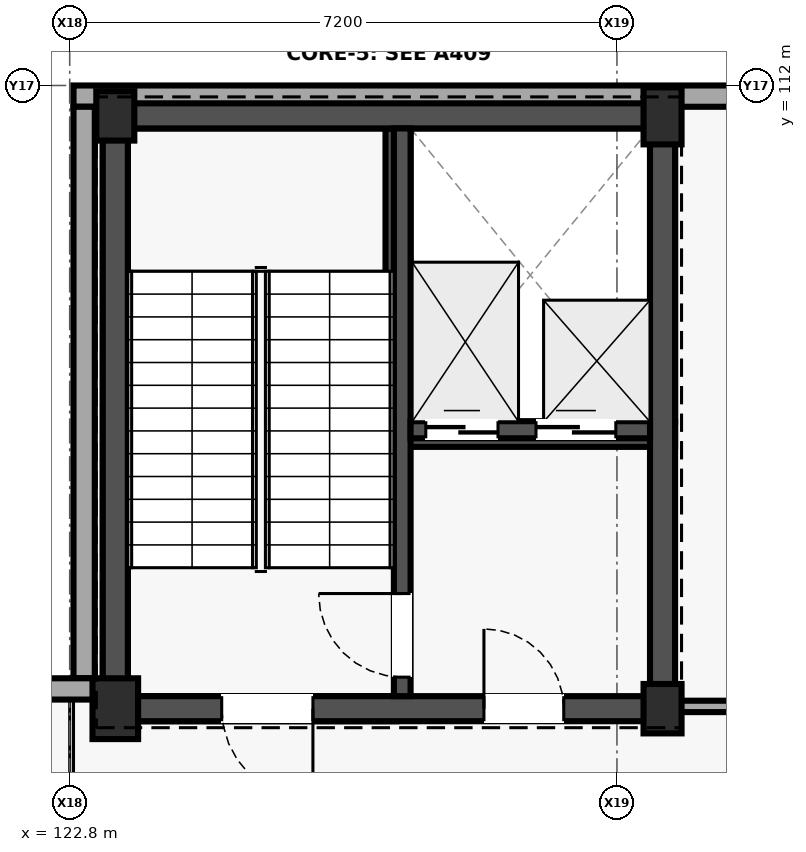
"""IFC4 building model, lengths in metres.
Left out: names, types, materials, properties, quantities, classifications, styles, units other than length and angle.
Written with IfcOpenShell. Run it as: python <this file> out.ifc"""

import sys

from ifc_helpers import new_model, si_unit, direction, frame, frame_2d, origin, origin_2d, place, context, subcontext, project, spatial, rectangle, extrude, element, fill, save


model = new_model("IFC4")
c1 = context("Model", 3, precision=1e-05, world=origin(), true_north=direction((0.0, 1.0)))
c2 = subcontext(c1, "Body", "Model", "MODEL_VIEW")
j1 = project(units=[si_unit("LENGTHUNIT", "METRE"), si_unit("PLANEANGLEUNIT", "RADIAN")], contexts=[c1])
p1 = place(None, origin())
s1 = spatial("IfcSite", under=j1, at=p1, CompositionType="ELEMENT")
p2 = place(p1, origin())
s2 = spatial("IfcBuilding", under=s1, at=p2, CompositionType="ELEMENT")
p3 = place(p2, origin())
s3 = spatial("IfcBuildingStorey", under=s2, at=p3, CompositionType="ELEMENT", Elevation=0.0)
for number, where, z_axis, x_axis in (
    (1, (126.955, 107.41, -1.55), (0.0, 0.0, 1.0), (1.0, 0.0, 0.0)),
    (2, (126.955, 111.6, -1.55), (0.0, 0.0, 1.0), (1.0, 0.0, 0.0)),
):
    element("IfcWall", number, at=place(p3, frame(where, z_axis=z_axis, x_axis=x_axis)), inside=s3, PredefinedType="SHEAR", context=c2, shape_type="SweptSolid", body=[
        extrude(rectangle(XDim=3.81, YDim=0.33, at=frame_2d((1.905, 0.0))), origin(), (0.0, 0.0, 1.0), 1.3),
    ])
for number, where, z_axis, x_axis in (
    (3, (127.12, 107.575, -1.55), (0.0, 0.0, 1.0), (0.0, 1.0, 0.0)),
    (4, (130.6, 107.575, -1.55), (0.0, 0.0, 1.0), (0.0, 1.0, 0.0)),
):
    element("IfcWall", number, at=place(p3, frame(where, z_axis=z_axis, x_axis=x_axis)), inside=s3, PredefinedType="SHEAR", context=c2, shape_type="SweptSolid", body=[
        extrude(rectangle(XDim=3.86, YDim=0.33, at=frame_2d((1.93, 0.0))), origin(), (0.0, 0.0, 1.0), 1.3),
    ])
p4 = place(p3, frame((123.4, 103.965, -1.85), z_axis=(0.0, 0.0, 1.0), x_axis=(0.0, 1.0, 0.0)))
e5 = element("IfcWall", 5, at=p4, inside=s3, PredefinedType="SHEAR", context=c2, shape_type="SweptSolid", body=[
    extrude(rectangle(XDim=7.47, YDim=0.33, at=frame_2d((3.735, 0.0))), origin(), (0.0, 0.0, 1.0), 1.6),
])
for number, where, z_axis, x_axis in (
    (6, (123.235, 103.8, -1.85), (0.0, 0.0, 1.0), (1.0, 0.0, 0.0)),
    (7, (123.235, 111.6, -1.85), (0.0, 0.0, 1.0), (1.0, 0.0, 0.0)),
):
    element("IfcWall", number, at=place(p3, frame(where, z_axis=z_axis, x_axis=x_axis)), inside=s3, PredefinedType="SHEAR", context=c2, shape_type="SweptSolid", body=[
        extrude(rectangle(XDim=3.865, YDim=0.33, at=frame_2d((1.933, 0.0))), origin(), (0.0, 0.0, 1.0), 1.6),
    ])
p5 = place(p3, frame((123.4, 103.8, 0.0), z_axis=(0.0, 0.0, 1.0), x_axis=(1.0, 0.0, 0.0)))
e8 = element("IfcColumn", 8, at=p5, inside=s3, PredefinedType="COLUMN", context=c2, shape_type="SweptSolid", body=[
    extrude(rectangle(XDim=0.6, YDim=0.8, at=origin_2d()), origin(), (0.0, 0.0, 1.0), 4.2),
])
for number, where, z_axis, x_axis in (
    (9, (123.4, 111.6, 0.0), (0.0, 0.0, 1.0), (1.0, 0.0, 0.0)),
    (10, (130.6, 103.8, 0.0), (0.0, 0.0, 1.0), (1.0, 0.0, 0.0)),
):
    element("IfcColumn", number, at=place(p3, frame(where, z_axis=z_axis, x_axis=x_axis)), inside=s3, PredefinedType="COLUMN", context=c2, shape_type="SweptSolid", body=[
        extrude(rectangle(XDim=0.5, YDim=0.65, at=origin_2d()), origin(), (0.0, 0.0, 1.0), 4.2),
    ])
p6 = place(p3, frame((130.6, 111.6, 0.0), z_axis=(0.0, 0.0, 1.0), x_axis=(1.0, 0.0, 0.0)))
e11 = element("IfcColumn", 11, at=p6, inside=s3, PredefinedType="COLUMN", context=c2, shape_type="SweptSolid", body=[
    extrude(rectangle(XDim=0.5, YDim=0.75, at=origin_2d()), origin(), (0.0, 0.0, 1.0), 4.2),
])
p7 = place(p3, frame((135.777, 111.86, 0.0), z_axis=(0.0, 0.0, 1.0), x_axis=(-1.0, 0.0, 0.0)))
e12 = element("IfcWall", 12, at=p7, inside=s3, PredefinedType="SOLIDWALL", context=c2, shape_type="SweptSolid", body=[
    extrude(rectangle(XDim=12.927, YDim=0.28, at=frame_2d((6.463, 0.0))), origin(), (0.0, 0.0, 1.0), 3.98),
])
p8 = place(p7, frame((1.304, 0.0, 0.85)))
e13 = element("IfcOpeningElement", 13, at=p8, cuts=e12, PredefinedType="OPENING", context=c2, shape_type="SweptSolid", body=[
    extrude(rectangle(XDim=1.7, YDim=1.75, at=frame_2d((0.85, 0.875))), frame((0.0, 0.15, 0.0), z_axis=(0.0, -1.0, 0.0), x_axis=(1.0, 0.0, 0.0)), (0.0, 0.0, 1.0), 0.3),
])
p9 = place(p3, frame((122.99, 111.72, 0.0), z_axis=(0.0, 0.0, 1.0), x_axis=(0.0, -1.0, 0.0)))
e14 = element("IfcWall", 14, at=p9, inside=s3, PredefinedType="SOLIDWALL", context=c2, shape_type="SweptSolid", body=[
    extrude(rectangle(XDim=7.52, YDim=0.28, at=frame_2d((3.76, 0.0))), origin(), (0.0, 0.0, 1.0), 3.98),
])
p10 = place(p3, frame((123.13, 104.06, 0.0), z_axis=(0.0, 0.0, 1.0), x_axis=(-1.0, 0.0, 0.0)))
e15 = element("IfcWall", 15, at=p10, inside=s3, PredefinedType="SOLIDWALL", context=c2, shape_type="SweptSolid", body=[
    extrude(rectangle(XDim=7.53, YDim=0.28, at=frame_2d((3.765, 0.0))), origin(), (0.0, 0.0, 1.0), 3.98),
])
p11 = place(p10, frame((1.358, 0.0, 1.05)))
e16 = element("IfcOpeningElement", 16, at=p11, cuts=e15, PredefinedType="OPENING", context=c2, shape_type="SweptSolid", body=[
    extrude(rectangle(XDim=1.05, YDim=1.3, at=frame_2d((0.525, 0.65))), frame((0.0, 0.15, 0.0), z_axis=(0.0, -1.0, 0.0), x_axis=(1.0, 0.0, 0.0)), (0.0, 0.0, 1.0), 0.3),
])
p12 = place(p10, frame((4.848, 0.0, 1.05)))
e17 = element("IfcOpeningElement", 17, at=p12, cuts=e15, PredefinedType="OPENING", context=c2, shape_type="SweptSolid", body=[
    extrude(rectangle(XDim=1.6, YDim=1.35, at=frame_2d((0.8, 0.675))), frame((0.0, 0.15, 0.0), z_axis=(0.0, -1.0, 0.0), x_axis=(1.0, 0.0, 0.0)), (0.0, 0.0, 1.0), 0.3),
])
p13 = place(p3, frame((123.235, 103.8, 0.0), z_axis=(0.0, 0.0, 1.0), x_axis=(1.0, 0.0, 0.0)))
e18 = element("IfcWall", 18, at=p13, inside=s3, PredefinedType="SHEAR", context=c2, shape_type="SweptSolid", body=[
    extrude(rectangle(XDim=7.53, YDim=0.33, at=frame_2d((3.765, 0.0))), origin(), (0.0, 0.0, 1.0), 3.98),
])
p14 = place(p13, frame((5.015, 0.0, 0.0)))
e19 = element("IfcOpeningElement", 19, at=p14, cuts=e18, PredefinedType="OPENING", context=c2, shape_type="SweptSolid", body=[
    extrude(rectangle(XDim=1.05, YDim=2.15, at=frame_2d((0.525, 1.075))), frame((0.0, 0.175, 0.0), z_axis=(0.0, -1.0, 0.0), x_axis=(1.0, 0.0, 0.0)), (0.0, 0.0, 1.0), 0.35),
])
p15 = place(p13, frame((1.565, 0.0, 0.0)))
e20 = element("IfcOpeningElement", 20, at=p15, cuts=e18, PredefinedType="OPENING", context=c2, shape_type="SweptSolid", body=[
    extrude(rectangle(XDim=1.2, YDim=2.2, at=frame_2d((0.6, 1.1))), frame((0.0, 0.175, 0.0), z_axis=(0.0, -1.0, 0.0), x_axis=(1.0, 0.0, 0.0)), (0.0, 0.0, 1.0), 0.35),
])
p16 = place(p3, frame((123.235, 111.6, 0.0), z_axis=(0.0, 0.0, 1.0), x_axis=(1.0, 0.0, 0.0)))
e21 = element("IfcWall", 21, at=p16, inside=s3, PredefinedType="SHEAR", context=c2, shape_type="SweptSolid", body=[
    extrude(rectangle(XDim=7.53, YDim=0.33, at=frame_2d((3.765, 0.0))), origin(), (0.0, 0.0, 1.0), 3.98),
])
for number, where, z_axis, x_axis in (
    (22, (123.4, 103.965, 0.0), (0.0, 0.0, 1.0), (0.0, 1.0, 0.0)),
    (23, (130.6, 103.965, 0.0), (0.0, 0.0, 1.0), (0.0, 1.0, 0.0)),
):
    element("IfcWall", number, at=place(p3, frame(where, z_axis=z_axis, x_axis=x_axis)), inside=s3, PredefinedType="SHEAR", context=c2, shape_type="SweptSolid", body=[
        extrude(rectangle(XDim=7.47, YDim=0.33, at=frame_2d((3.735, 0.0))), origin(), (0.0, 0.0, 1.0), 3.98),
    ])
p17 = place(p3, frame((127.175, 103.965, 0.0), z_axis=(0.0, 0.0, 1.0), x_axis=(0.0, 1.0, 0.0)))
e24 = element("IfcWall", 24, at=p17, inside=s3, PredefinedType="SHEAR", context=c2, shape_type="SweptSolid", body=[
    extrude(rectangle(XDim=7.47, YDim=0.22, at=frame_2d((3.735, 0.0))), origin(), (0.0, 0.0, 1.0), 3.98),
])
p18 = place(p17, frame((0.25, 0.0, 0.0)))
e25 = element("IfcOpeningElement", 25, at=p18, cuts=e24, PredefinedType="OPENING", context=c2, shape_type="SweptSolid", body=[
    extrude(rectangle(XDim=1.1, YDim=2.15, at=frame_2d((0.55, 1.075))), frame((0.0, 0.12, 0.0), z_axis=(0.0, -1.0, 0.0), x_axis=(1.0, 0.0, 0.0)), (0.0, 0.0, 1.0), 0.24),
])
p19 = place(p3, frame((127.285, 107.47, 0.0), z_axis=(0.0, 0.0, 1.0), x_axis=(1.0, 0.0, 0.0)))
e26 = element("IfcWall", 26, at=p19, inside=s3, PredefinedType="SHEAR", context=c2, shape_type="SweptSolid", body=[
    extrude(rectangle(XDim=3.15, YDim=0.225, at=frame_2d((1.575, 0.0))), origin(), (0.0, 0.0, 1.0), 3.98),
])
p20 = place(p19, frame((0.2, 0.0, 0.0)))
e27 = element("IfcOpeningElement", 27, at=p20, cuts=e26, PredefinedType="OPENING", context=c2, shape_type="SweptSolid", body=[
    extrude(rectangle(XDim=0.95, YDim=2.15, at=frame_2d((0.475, 1.075))), frame((0.0, 0.123, 0.0), z_axis=(0.0, -1.0, 0.0), x_axis=(1.0, 0.0, 0.0)), (0.0, 0.0, 1.0), 0.245),
])
p21 = place(p19, frame((1.65, 0.0, 0.0)))
e28 = element("IfcOpeningElement", 28, at=p21, cuts=e26, PredefinedType="OPENING", context=c2, shape_type="SweptSolid", body=[
    extrude(rectangle(XDim=1.05, YDim=2.2, at=frame_2d((0.525, 1.1))), frame((0.0, 0.123, 0.0), z_axis=(0.0, -1.0, 0.0), x_axis=(1.0, 0.0, 0.0)), (0.0, 0.0, 1.0), 0.245),
])
p22 = place(p3, frame((130.83, 103.83, 0.0), z_axis=(0.0, 0.0, 1.0), x_axis=(1.0, 0.0, 0.0)))
e29 = element("IfcWall", 29, at=p22, inside=s3, PredefinedType="PARTITIONING", context=c2, shape_type="SweptSolid", body=[
    extrude(rectangle(XDim=20.74, YDim=0.15, at=frame_2d((10.37, 0.0))), origin(), (0.0, 0.0, 1.0), 3.915),
])
p23 = place(p22, frame((9.795, 0.0, 0.0)))
e30 = element("IfcOpeningElement", 30, at=p23, cuts=e29, PredefinedType="OPENING", context=c2, shape_type="SweptSolid", body=[
    extrude(rectangle(XDim=1.15, YDim=2.2, at=frame_2d((0.575, 1.1))), frame((0.0, 0.085, 0.0), z_axis=(0.0, -1.0, 0.0), x_axis=(1.0, 0.0, 0.0)), (0.0, 0.0, 1.0), 0.17),
])
p24 = place(p20, origin())
e31 = element("IfcDoor", 31, at=p24, inside=s3, OperationType="SLIDING_TO_LEFT", PredefinedType="DOOR", context=c2, shape_type="SweptSolid", body=[
    extrude(rectangle(XDim=0.95, YDim=2.15, at=frame_2d((0.475, 1.075))), frame((0.0, 0.025, 0.0), z_axis=(0.0, -1.0, 0.0), x_axis=(1.0, 0.0, 0.0)), (0.0, 0.0, 1.0), 0.05),
])
fill(e27, e31)
p25 = place(p21, origin())
e32 = element("IfcDoor", 32, at=p25, inside=s3, OperationType="SLIDING_TO_RIGHT", PredefinedType="DOOR", context=c2, shape_type="SweptSolid", body=[
    extrude(rectangle(XDim=1.05, YDim=2.2, at=frame_2d((0.525, 1.1))), frame((0.0, 0.025, 0.0), z_axis=(0.0, -1.0, 0.0), x_axis=(1.0, 0.0, 0.0)), (0.0, 0.0, 1.0), 0.05),
])
fill(e28, e32)
p26 = place(p18, origin())
e33 = element("IfcDoor", 33, at=p26, inside=s3, OperationType="SINGLE_SWING_RIGHT", PredefinedType="DOOR", context=c2, shape_type="SweptSolid", body=[
    extrude(rectangle(XDim=1.1, YDim=2.15, at=frame_2d((0.55, 1.075))), frame((0.0, 0.025, 0.0), z_axis=(0.0, -1.0, 0.0), x_axis=(1.0, 0.0, 0.0)), (0.0, 0.0, 1.0), 0.05),
])
fill(e25, e33)
p27 = place(p14, origin())
e34 = element("IfcDoor", 34, at=p27, inside=s3, OperationType="SINGLE_SWING_LEFT", PredefinedType="DOOR", context=c2, shape_type="SweptSolid", body=[
    extrude(rectangle(XDim=1.05, YDim=2.15, at=frame_2d((0.525, 1.075))), frame((0.0, 0.025, 0.0), z_axis=(0.0, -1.0, 0.0), x_axis=(1.0, 0.0, 0.0)), (0.0, 0.0, 1.0), 0.05),
])
fill(e19, e34)
p28 = place(p15, frame((1.2, 0.0, 0.0), z_axis=(0.0, 0.0, 1.0), x_axis=(-1.0, 0.0, 0.0)))
e35 = element("IfcDoor", 35, at=p28, inside=s3, OperationType="SINGLE_SWING_RIGHT", PredefinedType="DOOR", context=c2, shape_type="SweptSolid", body=[
    extrude(rectangle(XDim=1.2, YDim=2.2, at=frame_2d((0.6, 1.1))), frame((0.0, 0.025, 0.0), z_axis=(0.0, -1.0, 0.0), x_axis=(1.0, 0.0, 0.0)), (0.0, 0.0, 1.0), 0.05),
])
fill(e20, e35)
save(model, sys.argv[1])
